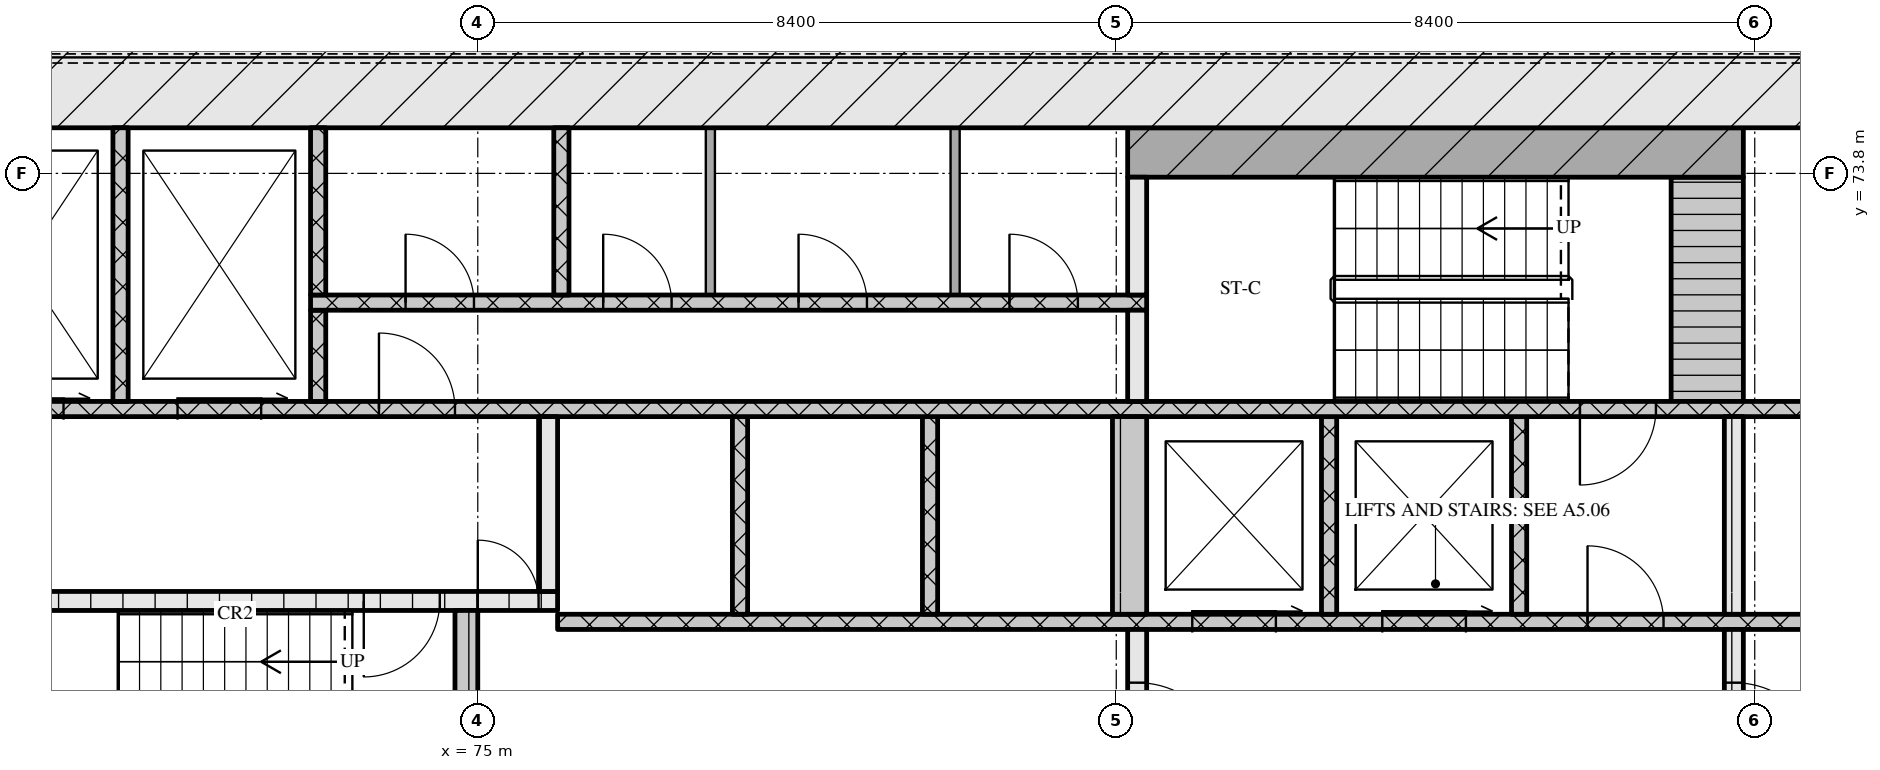
"""IFC4 building model, lengths in metres.
Left out: names, types, materials, properties, quantities, classifications, styles, units other than length and angle.
Written with IfcOpenShell. Run it as: python <this file> out.ifc"""

import sys

from ifc_helpers import new_model, si_unit, direction, frame, frame_2d, origin, place, context, subcontext, project, spatial, rectangle, extrude, element, fill, save


model = new_model("IFC4")
c1 = context("Model", 3, precision=1e-05, world=origin(), true_north=direction((0.0, 1.0)))
c2 = subcontext(c1, "Body", "Model", "MODEL_VIEW")
j1 = project(units=[si_unit("LENGTHUNIT", "METRE"), si_unit("PLANEANGLEUNIT", "RADIAN")], contexts=[c1])
p1 = place(None, origin())
s1 = spatial("IfcSite", under=j1, at=p1, CompositionType="ELEMENT")
p2 = place(p1, origin())
s2 = spatial("IfcBuilding", under=s1, at=p2, CompositionType="ELEMENT")
p3 = place(p2, frame((0.0, 0.0, 32.7)))
s3 = spatial("IfcBuildingStorey", under=s2, at=p3, CompositionType="ELEMENT", Elevation=32.7)
p4 = place(p3, frame((66.6, 75.0, 0.0), z_axis=(0.0, 0.0, 1.0), x_axis=(1.0, 0.0, 0.0)))
e1 = element("IfcWall", 1, at=p4, inside=s3, PredefinedType="SOLIDWALL", context=c2, shape_type="SweptSolid", body=[
    extrude(rectangle(XDim=42.0, YDim=1.2, at=frame_2d((21.0, 0.0))), origin(), (0.0, 0.0, 1.0), 4.22),
])
p5 = place(p3, frame((74.85, 65.2, 0.0), z_axis=(0.0, 0.0, 1.0), x_axis=(0.0, 1.0, 0.0)))
e2 = element("IfcWall", 2, at=p5, inside=s3, PredefinedType="SOLIDWALL", context=c2, shape_type="SweptSolid", body=[
    extrude(rectangle(XDim=2.85, YDim=0.3, at=frame_2d((1.425, 0.0))), origin(), (0.0, 0.0, 1.0), 4.22),
])
p6 = place(p3, frame((83.675, 65.2, 0.0), z_axis=(0.0, 0.0, 1.0), x_axis=(0.0, 1.0, 0.0)))
e3 = element("IfcWall", 3, at=p6, inside=s3, PredefinedType="SOLIDWALL", context=c2, shape_type="SweptSolid", body=[
    extrude(rectangle(XDim=2.6, YDim=0.25, at=frame_2d((1.3, 0.0))), origin(), (0.0, 0.0, 1.0), 4.22),
])
p7 = place(p6, frame((0.7, 0.0, 0.0)))
e4 = element("IfcOpeningElement", 4, at=p7, cuts=e3, PredefinedType="OPENING", context=c2, shape_type="SweptSolid", body=[
    extrude(rectangle(XDim=1.2, YDim=2.1, at=frame_2d((0.6, 1.05))), frame((0.0, 0.135, 0.0), z_axis=(0.0, -1.0, 0.0), x_axis=(1.0, 0.0, 0.0)), (0.0, 0.0, 1.0), 0.27),
])
p8 = place(p3, frame((91.525, 65.2, 0.0), z_axis=(0.0, 0.0, 1.0), x_axis=(0.0, 1.0, 0.0)))
e5 = element("IfcWall", 5, at=p8, inside=s3, PredefinedType="SOLIDWALL", context=c2, shape_type="SweptSolid", body=[
    extrude(rectangle(XDim=2.6, YDim=0.25, at=frame_2d((1.3, 0.0))), origin(), (0.0, 0.0, 1.0), 4.22),
])
p9 = place(p8, frame((0.7, 0.0, 0.0)))
e6 = element("IfcOpeningElement", 6, at=p9, cuts=e5, PredefinedType="OPENING", context=c2, shape_type="SweptSolid", body=[
    extrude(rectangle(XDim=1.2, YDim=2.1, at=frame_2d((0.6, 1.05))), frame((0.0, 0.135, 0.0), z_axis=(0.0, -1.0, 0.0), x_axis=(1.0, 0.0, 0.0)), (0.0, 0.0, 1.0), 0.27),
])
p10 = place(p3, frame((76.05, 67.9, 0.0), z_axis=(0.0, 0.0, 1.0), x_axis=(1.0, 0.0, 0.0)))
e7 = element("IfcWall", 7, at=p10, inside=s3, PredefinedType="SOLIDWALL", context=c2, shape_type="SweptSolid", body=[
    extrude(rectangle(XDim=23.1, YDim=0.2, at=frame_2d((11.55, 0.0))), origin(), (0.0, 0.0, 1.0), 4.22),
])
p11 = place(p10, frame((8.35, 0.0, 0.0)))
e8 = element("IfcOpeningElement", 8, at=p11, cuts=e7, PredefinedType="OPENING", context=c2, shape_type="SweptSolid", body=[
    extrude(rectangle(XDim=1.1, YDim=2.1, at=frame_2d((0.55, 1.05))), frame((0.0, 0.11, 0.0), z_axis=(0.0, -1.0, 0.0), x_axis=(1.0, 0.0, 0.0)), (0.0, 0.0, 1.0), 0.22),
])
p12 = place(p10, frame((10.85, 0.0, 0.0)))
e9 = element("IfcOpeningElement", 9, at=p12, cuts=e7, PredefinedType="OPENING", context=c2, shape_type="SweptSolid", body=[
    extrude(rectangle(XDim=1.1, YDim=2.1, at=frame_2d((0.55, 1.05))), frame((0.0, 0.11, 0.0), z_axis=(0.0, -1.0, 0.0), x_axis=(1.0, 0.0, 0.0)), (0.0, 0.0, 1.0), 0.22),
])
p13 = place(p10, frame((13.55, 0.0, 0.0)))
e10 = element("IfcOpeningElement", 10, at=p13, cuts=e7, PredefinedType="OPENING", context=c2, shape_type="SweptSolid", body=[
    extrude(rectangle(XDim=1.0, YDim=2.1, at=frame_2d((0.5, 1.05))), frame((0.0, 0.11, 0.0), z_axis=(0.0, -1.0, 0.0), x_axis=(1.0, 0.0, 0.0)), (0.0, 0.0, 1.0), 0.22),
])
for number, where, z_axis, x_axis in (
    (11, (78.45, 68.0, 0.0), (0.0, 0.0, 1.0), (0.0, 1.0, 0.0)),
    (12, (80.95, 68.0, 0.0), (0.0, 0.0, 1.0), (0.0, 1.0, 0.0)),
):
    element("IfcWall", number, at=place(p3, frame(where, z_axis=z_axis, x_axis=x_axis)), inside=s3, PredefinedType="SOLIDWALL", context=c2, shape_type="SweptSolid", body=[
        extrude(rectangle(XDim=2.6, YDim=0.2, at=frame_2d((1.3, 0.0))), origin(), (0.0, 0.0, 1.0), 4.22),
    ])
p14 = place(p3, frame((83.575, 68.0, 0.0), z_axis=(0.0, 0.0, 1.0), x_axis=(0.0, 1.0, 0.0)))
e13 = element("IfcWall", 13, at=p14, inside=s3, PredefinedType="SOLIDWALL", context=c2, shape_type="SweptSolid", body=[
    extrude(rectangle(XDim=2.6, YDim=0.45, at=frame_2d((1.3, 0.0))), origin(), (0.0, 0.0, 1.0), 4.22),
])
for number, where, z_axis, x_axis in (
    (14, (86.2, 68.0, 0.0), (0.0, 0.0, 1.0), (0.0, 1.0, 0.0)),
    (15, (88.7, 68.0, 0.0), (0.0, 0.0, 1.0), (0.0, 1.0, 0.0)),
):
    element("IfcWall", number, at=place(p3, frame(where, z_axis=z_axis, x_axis=x_axis)), inside=s3, PredefinedType="SOLIDWALL", context=c2, shape_type="SweptSolid", body=[
        extrude(rectangle(XDim=2.6, YDim=0.2, at=frame_2d((1.3, 0.0))), origin(), (0.0, 0.0, 1.0), 4.22),
    ])
p15 = place(p3, frame((91.525, 68.0, 0.0), z_axis=(0.0, 0.0, 1.0), x_axis=(0.0, 1.0, 0.0)))
e16 = element("IfcWall", 16, at=p15, inside=s3, PredefinedType="SOLIDWALL", context=c2, shape_type="SweptSolid", body=[
    extrude(rectangle(XDim=2.6, YDim=0.25, at=frame_2d((1.3, 0.0))), origin(), (0.0, 0.0, 1.0), 4.22),
])
p16 = place(p3, frame((67.8, 68.175, 0.0), z_axis=(0.0, 0.0, 1.0), x_axis=(1.0, 0.0, 0.0)))
e17 = element("IfcWall", 17, at=p16, inside=s3, PredefinedType="SOLIDWALL", context=c2, shape_type="SweptSolid", body=[
    extrude(rectangle(XDim=8.25, YDim=0.25, at=frame_2d((4.125, 0.0))), origin(), (0.0, 0.0, 1.0), 4.22),
])
p17 = place(p16, frame((5.7, 0.0, 0.0)))
e18 = element("IfcOpeningElement", 18, at=p17, cuts=e17, PredefinedType="OPENING", context=c2, shape_type="SweptSolid", body=[
    extrude(rectangle(XDim=1.0, YDim=2.1, at=frame_2d((0.5, 1.05))), frame((0.0, 0.135, 0.0), z_axis=(0.0, -1.0, 0.0), x_axis=(1.0, 0.0, 0.0)), (0.0, 0.0, 1.0), 0.27),
])
p18 = place(p16, frame((7.2, 0.0, 0.0)))
e19 = element("IfcOpeningElement", 19, at=p18, cuts=e17, PredefinedType="OPENING", context=c2, shape_type="SweptSolid", body=[
    extrude(rectangle(XDim=0.8, YDim=2.1, at=frame_2d((0.4, 1.05))), frame((0.0, 0.135, 0.0), z_axis=(0.0, -1.0, 0.0), x_axis=(1.0, 0.0, 0.0)), (0.0, 0.0, 1.0), 0.27),
])
p19 = place(p3, frame((75.925, 68.3, 0.0), z_axis=(0.0, 0.0, 1.0), x_axis=(0.0, 1.0, 0.0)))
e20 = element("IfcWall", 20, at=p19, inside=s3, PredefinedType="SOLIDWALL", context=c2, shape_type="SweptSolid", body=[
    extrude(rectangle(XDim=2.3, YDim=0.25, at=frame_2d((1.15, 0.0))), origin(), (0.0, 0.0, 1.0), 4.22),
])
p20 = place(p3, frame((67.8, 70.7, 0.0), z_axis=(0.0, 0.0, 1.0), x_axis=(1.0, 0.0, 0.0)))
e21 = element("IfcWall", 21, at=p20, inside=s3, PredefinedType="SOLIDWALL", context=c2, shape_type="SweptSolid", body=[
    extrude(rectangle(XDim=39.6, YDim=0.2, at=frame_2d((19.8, 0.0))), origin(), (0.0, 0.0, 1.0), 4.22),
])
p21 = place(p20, frame((0.65, 0.0, 0.0)))
e22 = element("IfcOpeningElement", 22, at=p21, cuts=e21, PredefinedType="OPENING", context=c2, shape_type="SweptSolid", body=[
    extrude(rectangle(XDim=1.1, YDim=2.1, at=frame_2d((0.55, 1.05))), frame((0.0, 0.11, 0.0), z_axis=(0.0, -1.0, 0.0), x_axis=(1.0, 0.0, 0.0)), (0.0, 0.0, 1.0), 0.22),
])
p22 = place(p20, frame((3.25, 0.0, 0.0)))
e23 = element("IfcOpeningElement", 23, at=p22, cuts=e21, PredefinedType="OPENING", context=c2, shape_type="SweptSolid", body=[
    extrude(rectangle(XDim=1.1, YDim=2.1, at=frame_2d((0.55, 1.05))), frame((0.0, 0.11, 0.0), z_axis=(0.0, -1.0, 0.0), x_axis=(1.0, 0.0, 0.0)), (0.0, 0.0, 1.0), 0.22),
])
p23 = place(p20, frame((5.9, 0.0, 0.0)))
e24 = element("IfcOpeningElement", 24, at=p23, cuts=e21, PredefinedType="OPENING", context=c2, shape_type="SweptSolid", body=[
    extrude(rectangle(XDim=1.0, YDim=2.1, at=frame_2d((0.5, 1.05))), frame((0.0, 0.11, 0.0), z_axis=(0.0, -1.0, 0.0), x_axis=(1.0, 0.0, 0.0)), (0.0, 0.0, 1.0), 0.22),
])
p24 = place(p20, frame((21.7, 0.0, 0.0)))
e25 = element("IfcOpeningElement", 25, at=p24, cuts=e21, PredefinedType="OPENING", context=c2, shape_type="SweptSolid", body=[
    extrude(rectangle(XDim=1.0, YDim=2.1, at=frame_2d((0.5, 1.05))), frame((0.0, 0.11, 0.0), z_axis=(0.0, -1.0, 0.0), x_axis=(1.0, 0.0, 0.0)), (0.0, 0.0, 1.0), 0.22),
])
p25 = place(p20, frame((32.7, 0.0, 0.0)))
e26 = element("IfcOpeningElement", 26, at=p25, cuts=e21, PredefinedType="OPENING", context=c2, shape_type="SweptSolid", body=[
    extrude(rectangle(XDim=1.0, YDim=2.1, at=frame_2d((0.5, 1.05))), frame((0.0, 0.11, 0.0), z_axis=(0.0, -1.0, 0.0), x_axis=(1.0, 0.0, 0.0)), (0.0, 0.0, 1.0), 0.22),
])
p26 = place(p20, frame((35.25, 0.0, 0.0)))
e27 = element("IfcOpeningElement", 27, at=p26, cuts=e21, PredefinedType="OPENING", context=c2, shape_type="SweptSolid", body=[
    extrude(rectangle(XDim=1.1, YDim=2.1, at=frame_2d((0.55, 1.05))), frame((0.0, 0.11, 0.0), z_axis=(0.0, -1.0, 0.0), x_axis=(1.0, 0.0, 0.0)), (0.0, 0.0, 1.0), 0.22),
])
p27 = place(p20, frame((37.85, 0.0, 0.0)))
e28 = element("IfcOpeningElement", 28, at=p27, cuts=e21, PredefinedType="OPENING", context=c2, shape_type="SweptSolid", body=[
    extrude(rectangle(XDim=1.1, YDim=2.1, at=frame_2d((0.55, 1.05))), frame((0.0, 0.11, 0.0), z_axis=(0.0, -1.0, 0.0), x_axis=(1.0, 0.0, 0.0)), (0.0, 0.0, 1.0), 0.22),
])
p28 = place(p3, frame((70.3, 70.8, 0.0), z_axis=(0.0, 0.0, 1.0), x_axis=(0.0, 1.0, 0.0)))
e29 = element("IfcWall", 29, at=p28, inside=s3, PredefinedType="SOLIDWALL", context=c2, shape_type="SweptSolid", body=[
    extrude(rectangle(XDim=3.6, YDim=0.2, at=frame_2d((1.8, 0.0))), origin(), (0.0, 0.0, 1.0), 4.22),
])
p29 = place(p3, frame((72.9, 70.8, 0.0), z_axis=(0.0, 0.0, 1.0), x_axis=(0.0, 1.0, 0.0)))
e30 = element("IfcWall", 30, at=p29, inside=s3, PredefinedType="SOLIDWALL", context=c2, shape_type="SweptSolid", body=[
    extrude(rectangle(XDim=1.2, YDim=0.2, at=frame_2d((0.6, 0.0))), origin(), (0.0, 0.0, 1.0), 4.22),
])
p30 = place(p3, frame((83.675, 70.8, 0.0), z_axis=(0.0, 0.0, 1.0), x_axis=(0.0, 1.0, 0.0)))
e31 = element("IfcWall", 31, at=p30, inside=s3, PredefinedType="SOLIDWALL", context=c2, shape_type="SweptSolid", body=[
    extrude(rectangle(XDim=1.2, YDim=0.25, at=frame_2d((0.6, 0.0))), origin(), (0.0, 0.0, 1.0), 4.22),
])
p31 = place(p3, frame((91.175, 70.8, 0.0), z_axis=(0.0, 0.0, 1.0), x_axis=(0.0, 1.0, 0.0)))
e32 = element("IfcWall", 32, at=p31, inside=s3, PredefinedType="SOLIDWALL", context=c2, shape_type="SweptSolid", body=[
    extrude(rectangle(XDim=2.95, YDim=0.95, at=frame_2d((1.475, 0.0))), origin(), (0.0, 0.0, 1.0), 4.22),
])
p32 = place(p3, frame((72.8, 72.1, 0.0), z_axis=(0.0, 0.0, 1.0), x_axis=(1.0, 0.0, 0.0)))
e33 = element("IfcWall", 33, at=p32, inside=s3, PredefinedType="SOLIDWALL", context=c2, shape_type="SweptSolid", body=[
    extrude(rectangle(XDim=11.0, YDim=0.2, at=frame_2d((5.5, 0.0))), origin(), (0.0, 0.0, 1.0), 4.22),
])
p33 = place(p32, frame((1.25, 0.0, 0.0)))
e34 = element("IfcOpeningElement", 34, at=p33, cuts=e33, PredefinedType="OPENING", context=c2, shape_type="SweptSolid", body=[
    extrude(rectangle(XDim=0.9, YDim=2.1, at=frame_2d((0.45, 1.05))), frame((0.0, 0.11, 0.0), z_axis=(0.0, -1.0, 0.0), x_axis=(1.0, 0.0, 0.0)), (0.0, 0.0, 1.0), 0.22),
])
p34 = place(p32, frame((3.85, 0.0, 0.0)))
e35 = element("IfcOpeningElement", 35, at=p34, cuts=e33, PredefinedType="OPENING", context=c2, shape_type="SweptSolid", body=[
    extrude(rectangle(XDim=0.9, YDim=2.1, at=frame_2d((0.45, 1.05))), frame((0.0, 0.11, 0.0), z_axis=(0.0, -1.0, 0.0), x_axis=(1.0, 0.0, 0.0)), (0.0, 0.0, 1.0), 0.22),
])
p35 = place(p32, frame((6.42, 0.0, 0.0)))
e36 = element("IfcOpeningElement", 36, at=p35, cuts=e33, PredefinedType="OPENING", context=c2, shape_type="SweptSolid", body=[
    extrude(rectangle(XDim=0.9, YDim=2.1, at=frame_2d((0.45, 1.05))), frame((0.0, 0.11, 0.0), z_axis=(0.0, -1.0, 0.0), x_axis=(1.0, 0.0, 0.0)), (0.0, 0.0, 1.0), 0.22),
])
p36 = place(p32, frame((9.195, 0.0, 0.0)))
e37 = element("IfcOpeningElement", 37, at=p36, cuts=e33, PredefinedType="OPENING", context=c2, shape_type="SweptSolid", body=[
    extrude(rectangle(XDim=0.9, YDim=2.1, at=frame_2d((0.45, 1.05))), frame((0.0, 0.11, 0.0), z_axis=(0.0, -1.0, 0.0), x_axis=(1.0, 0.0, 0.0)), (0.0, 0.0, 1.0), 0.22),
])
for number, where, z_axis, x_axis in (
    (38, (72.9, 72.2, 0.0), (0.0, 0.0, 1.0), (0.0, 1.0, 0.0)),
    (39, (76.1, 72.2, 0.0), (0.0, 0.0, 1.0), (0.0, 1.0, 0.0)),
):
    element("IfcWall", number, at=place(p3, frame(where, z_axis=z_axis, x_axis=x_axis)), inside=s3, PredefinedType="SOLIDWALL", context=c2, shape_type="SweptSolid", body=[
        extrude(rectangle(XDim=2.2, YDim=0.2, at=frame_2d((1.1, 0.0))), origin(), (0.0, 0.0, 1.0), 4.22),
    ])
for number, where, z_axis, x_axis in (
    (40, (78.06, 72.2, 0.0), (0.0, 0.0, 1.0), (0.0, 1.0, 0.0)),
    (41, (81.28, 72.2, 0.0), (0.0, 0.0, 1.0), (0.0, 1.0, 0.0)),
):
    element("IfcWall", number, at=place(p3, frame(where, z_axis=z_axis, x_axis=x_axis)), inside=s3, PredefinedType="PARTITIONING", context=c2, shape_type="SweptSolid", body=[
        extrude(rectangle(XDim=2.2, YDim=0.12, at=frame_2d((1.1, 0.0))), origin(), (0.0, 0.0, 1.0), 4.22),
    ])
p37 = place(p3, frame((83.675, 72.2, 0.0), z_axis=(0.0, 0.0, 1.0), x_axis=(0.0, 1.0, 0.0)))
e42 = element("IfcWall", 42, at=p37, inside=s3, PredefinedType="SOLIDWALL", context=c2, shape_type="SweptSolid", body=[
    extrude(rectangle(XDim=1.55, YDim=0.25, at=frame_2d((0.775, 0.0))), origin(), (0.0, 0.0, 1.0), 4.22),
])
p38 = place(p3, frame((83.55, 74.075, 0.0), z_axis=(0.0, 0.0, 1.0), x_axis=(1.0, 0.0, 0.0)))
e43 = element("IfcWall", 43, at=p38, inside=s3, PredefinedType="SOLIDWALL", context=c2, shape_type="SweptSolid", body=[
    extrude(rectangle(XDim=8.1, YDim=0.65, at=frame_2d((4.05, 0.0))), origin(), (0.0, 0.0, 1.0), 4.22),
])
p39 = place(p7, origin())
e44 = element("IfcDoor", 44, at=p39, inside=s3, OperationType="SINGLE_SWING_RIGHT", PredefinedType="DOOR", context=c2, shape_type="SweptSolid", body=[
    extrude(rectangle(XDim=1.2, YDim=2.1, at=frame_2d((0.6, 1.05))), frame((0.0, 0.025, 0.0), z_axis=(0.0, -1.0, 0.0), x_axis=(1.0, 0.0, 0.0)), (0.0, 0.0, 1.0), 0.05),
])
fill(e4, e44)
p40 = place(p9, origin())
e45 = element("IfcDoor", 45, at=p40, inside=s3, OperationType="SINGLE_SWING_RIGHT", PredefinedType="DOOR", context=c2, shape_type="SweptSolid", body=[
    extrude(rectangle(XDim=1.2, YDim=2.1, at=frame_2d((0.6, 1.05))), frame((0.0, 0.025, 0.0), z_axis=(0.0, -1.0, 0.0), x_axis=(1.0, 0.0, 0.0)), (0.0, 0.0, 1.0), 0.05),
])
fill(e6, e45)
p41 = place(p11, origin())
e46 = element("IfcDoor", 46, at=p41, inside=s3, OperationType="SLIDING_TO_RIGHT", PredefinedType="DOOR", context=c2, shape_type="SweptSolid", body=[
    extrude(rectangle(XDim=1.1, YDim=2.1, at=frame_2d((0.55, 1.05))), frame((0.0, 0.025, 0.0), z_axis=(0.0, -1.0, 0.0), x_axis=(1.0, 0.0, 0.0)), (0.0, 0.0, 1.0), 0.05),
])
fill(e8, e46)
p42 = place(p12, origin())
e47 = element("IfcDoor", 47, at=p42, inside=s3, OperationType="SLIDING_TO_RIGHT", PredefinedType="DOOR", context=c2, shape_type="SweptSolid", body=[
    extrude(rectangle(XDim=1.1, YDim=2.1, at=frame_2d((0.55, 1.05))), frame((0.0, 0.025, 0.0), z_axis=(0.0, -1.0, 0.0), x_axis=(1.0, 0.0, 0.0)), (0.0, 0.0, 1.0), 0.05),
])
fill(e9, e47)
p43 = place(p13, origin())
e48 = element("IfcDoor", 48, at=p43, inside=s3, OperationType="SINGLE_SWING_LEFT", PredefinedType="DOOR", context=c2, shape_type="SweptSolid", body=[
    extrude(rectangle(XDim=1.0, YDim=2.1, at=frame_2d((0.5, 1.05))), frame((0.0, 0.025, 0.0), z_axis=(0.0, -1.0, 0.0), x_axis=(1.0, 0.0, 0.0)), (0.0, 0.0, 1.0), 0.05),
])
fill(e10, e48)
p44 = place(p17, origin())
e49 = element("IfcDoor", 49, at=p44, inside=s3, OperationType="SINGLE_SWING_RIGHT", PredefinedType="DOOR", context=c2, shape_type="SweptSolid", body=[
    extrude(rectangle(XDim=1.0, YDim=2.1, at=frame_2d((0.5, 1.05))), frame((0.0, 0.025, 0.0), z_axis=(0.0, -1.0, 0.0), x_axis=(1.0, 0.0, 0.0)), (0.0, 0.0, 1.0), 0.05),
])
fill(e18, e49)
p45 = place(p18, origin())
e50 = element("IfcDoor", 50, at=p45, inside=s3, OperationType="SINGLE_SWING_LEFT", PredefinedType="DOOR", context=c2, shape_type="SweptSolid", body=[
    extrude(rectangle(XDim=0.8, YDim=2.1, at=frame_2d((0.4, 1.05))), frame((0.0, 0.025, 0.0), z_axis=(0.0, -1.0, 0.0), x_axis=(1.0, 0.0, 0.0)), (0.0, 0.0, 1.0), 0.05),
])
fill(e19, e50)
p46 = place(p21, origin())
e51 = element("IfcDoor", 51, at=p46, inside=s3, OperationType="SLIDING_TO_RIGHT", PredefinedType="DOOR", context=c2, shape_type="SweptSolid", body=[
    extrude(rectangle(XDim=1.1, YDim=2.1, at=frame_2d((0.55, 1.05))), frame((0.0, 0.025, 0.0), z_axis=(0.0, -1.0, 0.0), x_axis=(1.0, 0.0, 0.0)), (0.0, 0.0, 1.0), 0.05),
])
fill(e22, e51)
p47 = place(p22, origin())
e52 = element("IfcDoor", 52, at=p47, inside=s3, OperationType="SLIDING_TO_RIGHT", PredefinedType="DOOR", context=c2, shape_type="SweptSolid", body=[
    extrude(rectangle(XDim=1.1, YDim=2.1, at=frame_2d((0.55, 1.05))), frame((0.0, 0.025, 0.0), z_axis=(0.0, -1.0, 0.0), x_axis=(1.0, 0.0, 0.0)), (0.0, 0.0, 1.0), 0.05),
])
fill(e23, e52)
p48 = place(p23, origin())
e53 = element("IfcDoor", 53, at=p48, inside=s3, OperationType="SINGLE_SWING_LEFT", PredefinedType="DOOR", context=c2, shape_type="SweptSolid", body=[
    extrude(rectangle(XDim=1.0, YDim=2.1, at=frame_2d((0.5, 1.05))), frame((0.0, 0.025, 0.0), z_axis=(0.0, -1.0, 0.0), x_axis=(1.0, 0.0, 0.0)), (0.0, 0.0, 1.0), 0.05),
])
fill(e24, e53)
p49 = place(p24, origin())
e54 = element("IfcDoor", 54, at=p49, inside=s3, OperationType="SINGLE_SWING_RIGHT", PredefinedType="DOOR", context=c2, shape_type="SweptSolid", body=[
    extrude(rectangle(XDim=1.0, YDim=2.1, at=frame_2d((0.5, 1.05))), frame((0.0, 0.025, 0.0), z_axis=(0.0, -1.0, 0.0), x_axis=(1.0, 0.0, 0.0)), (0.0, 0.0, 1.0), 0.05),
])
fill(e25, e54)
p50 = place(p33, origin())
e55 = element("IfcDoor", 55, at=p50, inside=s3, OperationType="SINGLE_SWING_LEFT", PredefinedType="DOOR", context=c2, shape_type="SweptSolid", body=[
    extrude(rectangle(XDim=0.9, YDim=2.1, at=frame_2d((0.45, 1.05))), frame((0.0, 0.025, 0.0), z_axis=(0.0, -1.0, 0.0), x_axis=(1.0, 0.0, 0.0)), (0.0, 0.0, 1.0), 0.05),
])
fill(e34, e55)
p51 = place(p34, origin())
e56 = element("IfcDoor", 56, at=p51, inside=s3, OperationType="SINGLE_SWING_LEFT", PredefinedType="DOOR", context=c2, shape_type="SweptSolid", body=[
    extrude(rectangle(XDim=0.9, YDim=2.1, at=frame_2d((0.45, 1.05))), frame((0.0, 0.025, 0.0), z_axis=(0.0, -1.0, 0.0), x_axis=(1.0, 0.0, 0.0)), (0.0, 0.0, 1.0), 0.05),
])
fill(e35, e56)
p52 = place(p35, origin())
e57 = element("IfcDoor", 57, at=p52, inside=s3, OperationType="SINGLE_SWING_LEFT", PredefinedType="DOOR", context=c2, shape_type="SweptSolid", body=[
    extrude(rectangle(XDim=0.9, YDim=2.1, at=frame_2d((0.45, 1.05))), frame((0.0, 0.025, 0.0), z_axis=(0.0, -1.0, 0.0), x_axis=(1.0, 0.0, 0.0)), (0.0, 0.0, 1.0), 0.05),
])
fill(e36, e57)
p53 = place(p36, origin())
e58 = element("IfcDoor", 58, at=p53, inside=s3, OperationType="SINGLE_SWING_LEFT", PredefinedType="DOOR", context=c2, shape_type="SweptSolid", body=[
    extrude(rectangle(XDim=0.9, YDim=2.1, at=frame_2d((0.45, 1.05))), frame((0.0, 0.025, 0.0), z_axis=(0.0, -1.0, 0.0), x_axis=(1.0, 0.0, 0.0)), (0.0, 0.0, 1.0), 0.05),
])
fill(e37, e58)
save(model, sys.argv[1])
